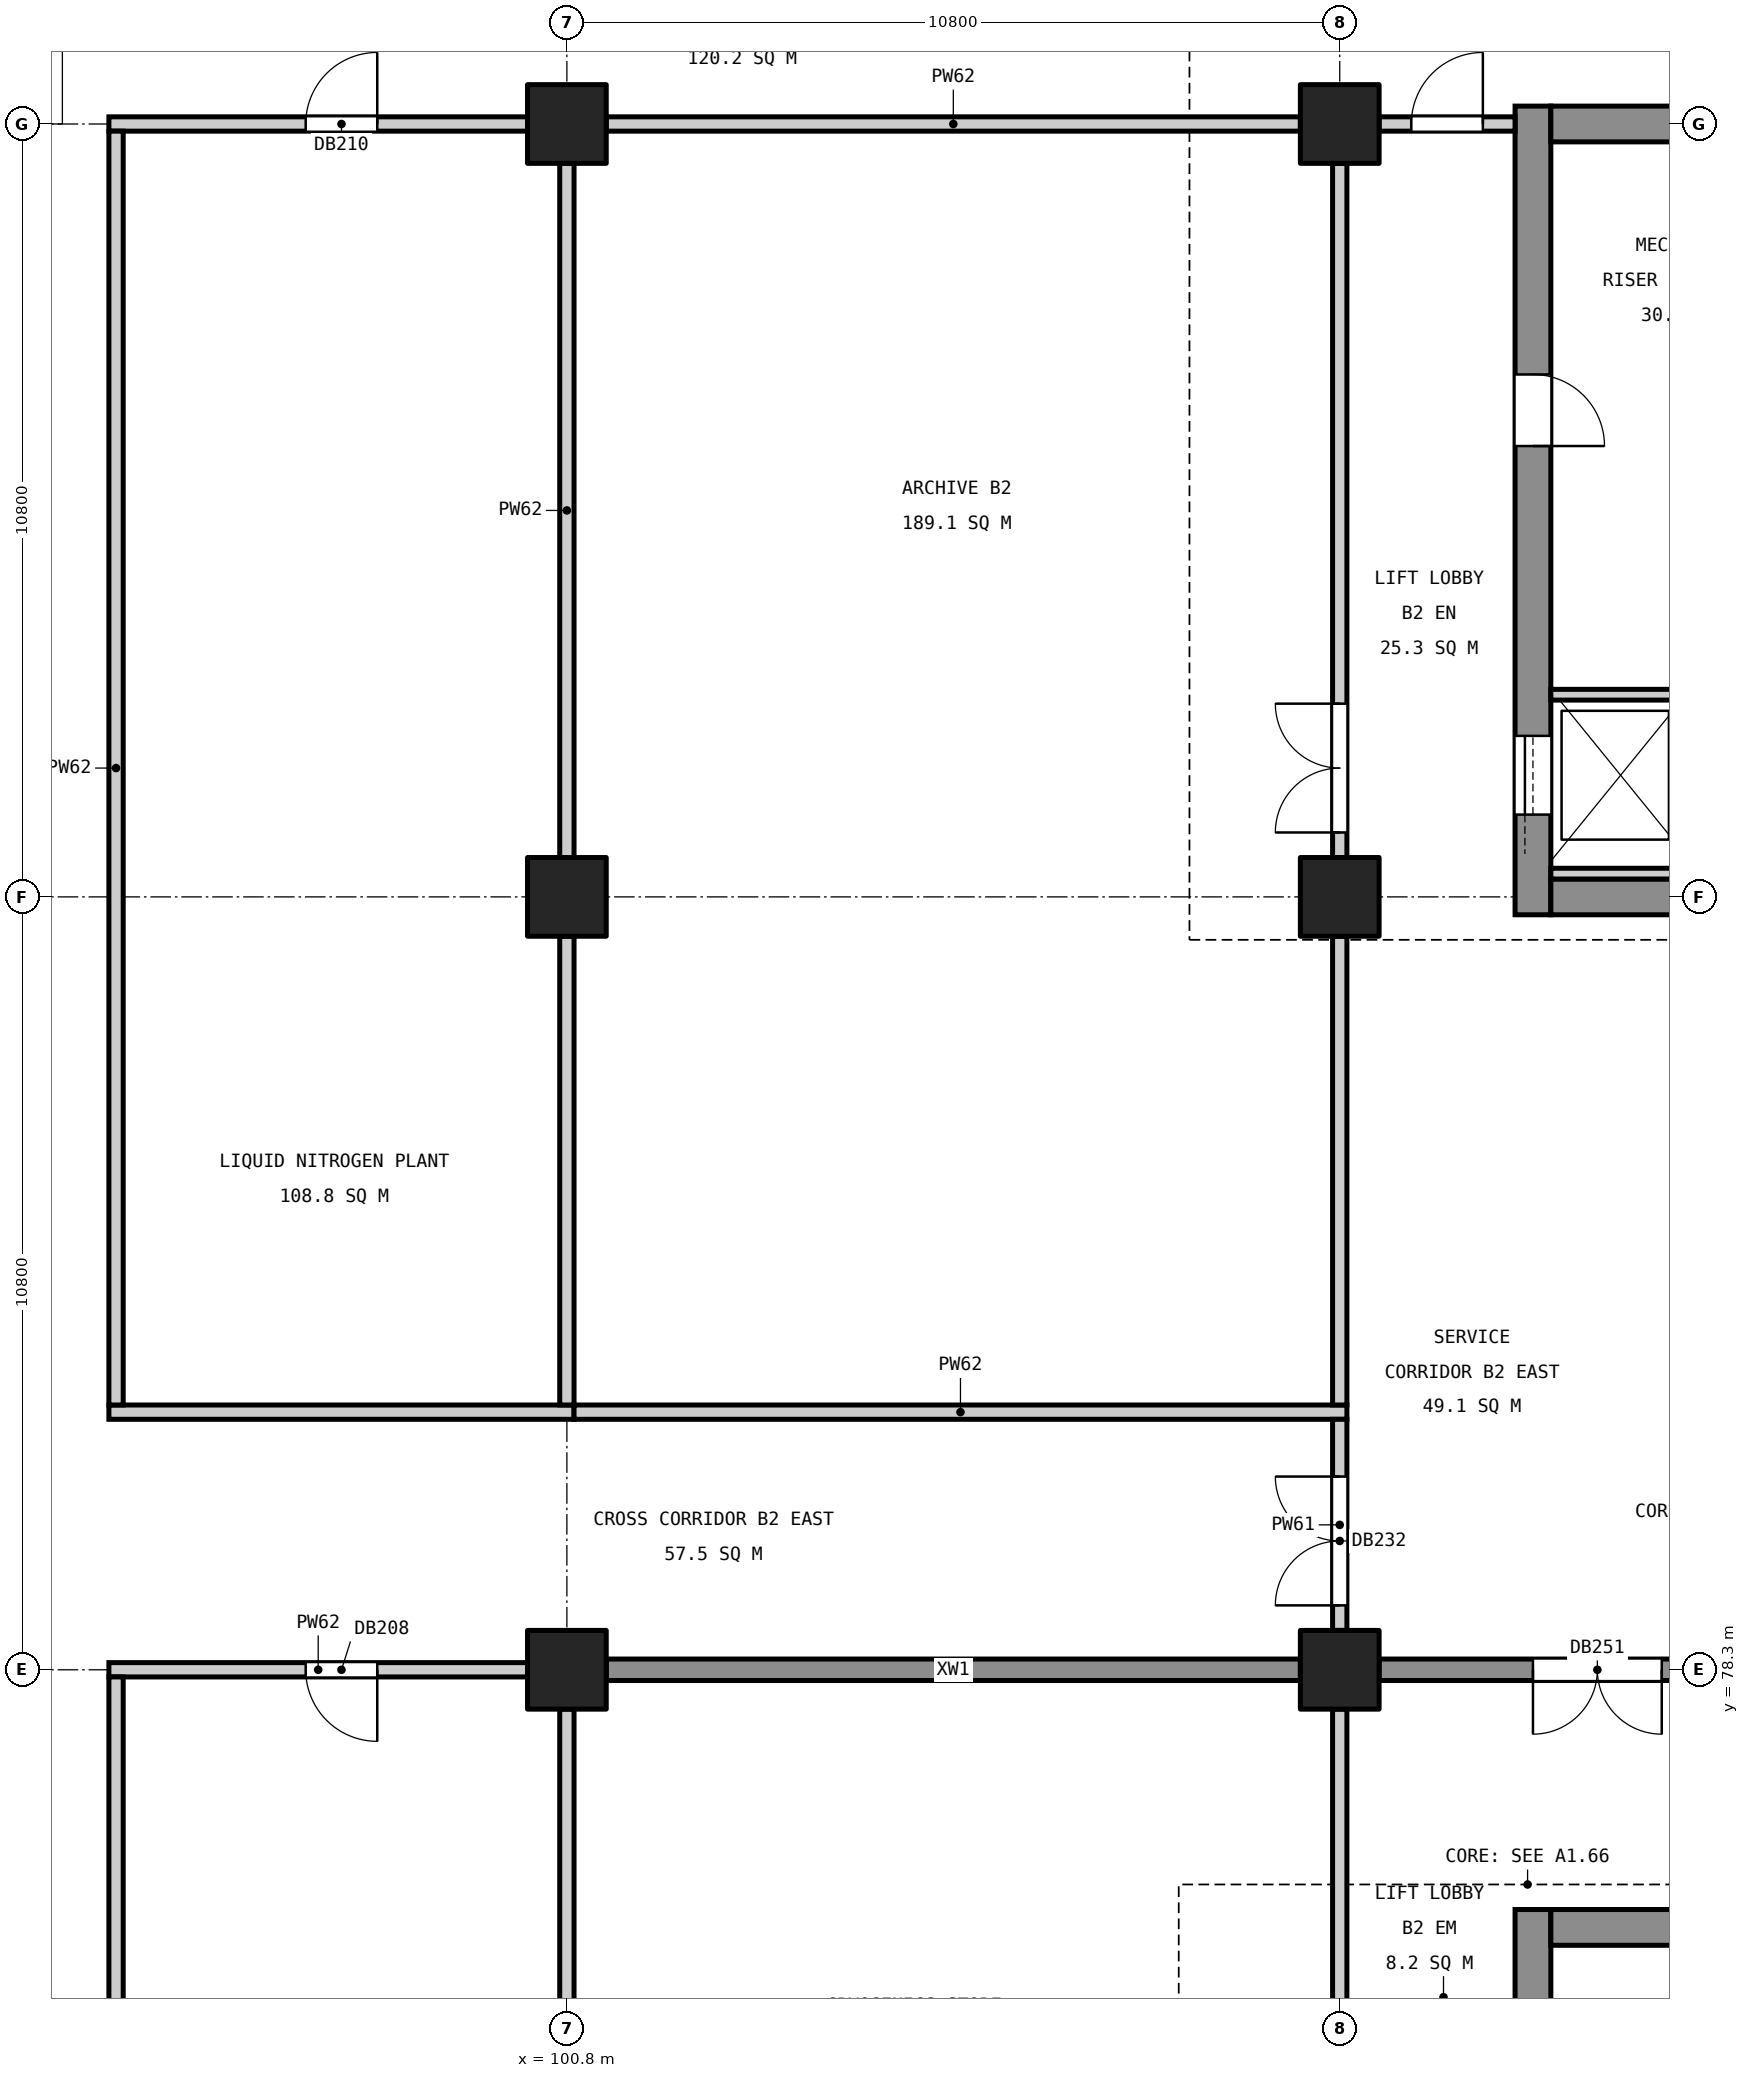
"""IFC4 building model, lengths in metres.
Left out: names, types, materials, properties, quantities, classifications, styles, units other than length and angle.
Written with IfcOpenShell. Run it as: python <this file> out.ifc"""

import sys

from ifc_helpers import new_model, si_unit, direction, frame, frame_2d, origin, origin_2d, place, context, subcontext, project, spatial, rectangle, extrude, element, fill, save


model = new_model("IFC4")
c1 = context("Model", 3, precision=1e-05, world=origin(), true_north=direction((0.0, 1.0)))
c2 = subcontext(c1, "Body", "Model", "MODEL_VIEW")
j1 = project(units=[si_unit("LENGTHUNIT", "METRE"), si_unit("PLANEANGLEUNIT", "RADIAN")], contexts=[c1])
p1 = place(None, origin())
s1 = spatial("IfcSite", under=j1, at=p1, CompositionType="ELEMENT")
p2 = place(p1, origin())
s2 = spatial("IfcBuilding", under=s1, at=p2, CompositionType="ELEMENT")
p3 = place(p2, frame((0.0, 0.0, -9.6)))
s3 = spatial("IfcBuildingStorey", under=s2, at=p3, CompositionType="ELEMENT", Elevation=-9.6)
for number, where, z_axis, x_axis in (
    (1, (111.6, 78.3, 0.0), (0.0, 0.0, 1.0), (1.0, 0.0, 0.0)),
    (2, (111.6, 89.1, 0.0), (0.0, 0.0, 1.0), (1.0, 0.0, 0.0)),
    (3, (111.6, 99.9, 0.0), (0.0, 0.0, 1.0), (1.0, 0.0, 0.0)),
    (4, (100.8, 78.3, 0.0), (0.0, 0.0, 1.0), (1.0, 0.0, 0.0)),
    (5, (100.8, 89.1, 0.0), (0.0, 0.0, 1.0), (1.0, 0.0, 0.0)),
    (6, (100.8, 99.9, 0.0), (0.0, 0.0, 1.0), (1.0, 0.0, 0.0)),
):
    element("IfcColumn", number, at=place(p3, frame(where, z_axis=z_axis, x_axis=x_axis)), inside=s3, PredefinedType="COLUMN", context=c2, shape_type="SweptSolid", body=[
        extrude(rectangle(XDim=1.1, YDim=1.1, at=origin_2d()), origin(), (0.0, 0.0, 1.0), 4.35),
    ])
p4 = place(p3, frame((114.3, 60.05, 0.0), z_axis=(0.0, 0.0, 1.0), x_axis=(0.0, 1.0, 0.0)))
e7 = element("IfcWall", 7, at=p4, inside=s3, PredefinedType="SHEAR", context=c2, shape_type="SweptSolid", body=[
    extrude(rectangle(XDim=14.9, YDim=0.5, at=frame_2d((7.45, 0.0))), origin(), (0.0, 0.0, 1.0), 4.35),
])
p5 = place(p4, frame((8.85, 0.0, 0.0)))
e8 = element("IfcOpeningElement", 8, at=p5, cuts=e7, PredefinedType="OPENING", context=c2, shape_type="SweptSolid", body=[
    extrude(rectangle(XDim=1.1, YDim=2.1, at=frame_2d((0.55, 1.05))), frame((0.0, 0.26, 0.0), z_axis=(0.0, -1.0, 0.0), x_axis=(1.0, 0.0, 0.0)), (0.0, 0.0, 1.0), 0.52),
])
p6 = place(p4, frame((11.4, 0.0, 0.0)))
e9 = element("IfcOpeningElement", 9, at=p6, cuts=e7, PredefinedType="OPENING", context=c2, shape_type="SweptSolid", body=[
    extrude(rectangle(XDim=1.1, YDim=2.1, at=frame_2d((0.55, 1.05))), frame((0.0, 0.26, 0.0), z_axis=(0.0, -1.0, 0.0), x_axis=(1.0, 0.0, 0.0)), (0.0, 0.0, 1.0), 0.52),
])
p7 = place(p4, frame((3.75, 0.0, 0.0)))
e10 = element("IfcOpeningElement", 10, at=p7, cuts=e7, PredefinedType="OPENING", context=c2, shape_type="SweptSolid", body=[
    extrude(rectangle(XDim=1.0, YDim=2.1, at=frame_2d((0.5, 1.05))), frame((0.0, 0.26, 0.0), z_axis=(0.0, -1.0, 0.0), x_axis=(1.0, 0.0, 0.0)), (0.0, 0.0, 1.0), 0.52),
])
p8 = place(p3, frame((118.55, 74.7, 0.0), z_axis=(0.0, 0.0, 1.0), x_axis=(-1.0, 0.0, 0.0)))
e11 = element("IfcWall", 11, at=p8, inside=s3, PredefinedType="SHEAR", context=c2, shape_type="SweptSolid", body=[
    extrude(rectangle(XDim=4.0, YDim=0.5, at=frame_2d((2.0, 0.0))), origin(), (0.0, 0.0, 1.0), 4.35),
])
p9 = place(p3, frame((114.3, 88.85, 0.0), z_axis=(0.0, 0.0, 1.0), x_axis=(0.0, 1.0, 0.0)))
e12 = element("IfcWall", 12, at=p9, inside=s3, PredefinedType="SHEAR", context=c2, shape_type="SweptSolid", body=[
    extrude(rectangle(XDim=11.3, YDim=0.5, at=frame_2d((5.65, 0.0))), origin(), (0.0, 0.0, 1.0), 4.35),
])
p10 = place(p9, frame((1.4, 0.0, 0.0)))
e13 = element("IfcOpeningElement", 13, at=p10, cuts=e12, PredefinedType="OPENING", context=c2, shape_type="SweptSolid", body=[
    extrude(rectangle(XDim=1.1, YDim=2.1, at=frame_2d((0.55, 1.05))), frame((0.0, 0.26, 0.0), z_axis=(0.0, -1.0, 0.0), x_axis=(1.0, 0.0, 0.0)), (0.0, 0.0, 1.0), 0.52),
])
p11 = place(p9, frame((6.55, 0.0, 0.0)))
e14 = element("IfcOpeningElement", 14, at=p11, cuts=e12, PredefinedType="OPENING", context=c2, shape_type="SweptSolid", body=[
    extrude(rectangle(XDim=1.0, YDim=2.1, at=frame_2d((0.5, 1.05))), frame((0.0, 0.26, 0.0), z_axis=(0.0, -1.0, 0.0), x_axis=(1.0, 0.0, 0.0)), (0.0, 0.0, 1.0), 0.52),
])
for number, where, z_axis, x_axis in (
    (15, (118.55, 89.1, 0.0), (0.0, 0.0, 1.0), (-1.0, 0.0, 0.0)),
    (16, (118.55, 99.9, 0.0), (0.0, 0.0, 1.0), (-1.0, 0.0, 0.0)),
):
    element("IfcWall", number, at=place(p3, frame(where, z_axis=z_axis, x_axis=x_axis)), inside=s3, PredefinedType="SHEAR", context=c2, shape_type="SweptSolid", body=[
        extrude(rectangle(XDim=4.0, YDim=0.5, at=frame_2d((2.0, 0.0))), origin(), (0.0, 0.0, 1.0), 4.35),
    ])
p12 = place(p3, frame((118.25, 78.3, 0.0), z_axis=(0.0, 0.0, 1.0), x_axis=(-1.0, 0.0, 0.0)))
e17 = element("IfcWall", 17, at=p12, inside=s3, PredefinedType="SHEAR", context=c2, shape_type="SweptSolid", body=[
    extrude(rectangle(XDim=6.1, YDim=0.3, at=frame_2d((3.05, 0.0))), origin(), (0.0, 0.0, 1.0), 4.35),
])
p13 = place(p12, frame((2.15, 0.0, 0.0)))
e18 = element("IfcOpeningElement", 18, at=p13, cuts=e17, PredefinedType="OPENING", context=c2, shape_type="SweptSolid", body=[
    extrude(rectangle(XDim=1.8, YDim=2.1, at=frame_2d((0.9, 1.05))), frame((0.0, 0.16, 0.0), z_axis=(0.0, -1.0, 0.0), x_axis=(1.0, 0.0, 0.0)), (0.0, 0.0, 1.0), 0.32),
])
p14 = place(p3, frame((111.05, 78.3, 0.0), z_axis=(0.0, 0.0, 1.0), x_axis=(-1.0, 0.0, 0.0)))
e19 = element("IfcWall", 19, at=p14, inside=s3, PredefinedType="SHEAR", context=c2, shape_type="SweptSolid", body=[
    extrude(rectangle(XDim=9.7, YDim=0.3, at=frame_2d((4.85, 0.0))), origin(), (0.0, 0.0, 1.0), 4.35),
])
for number, where, z_axis, x_axis in (
    (20, (116.35, 91.925, 0.0), (0.0, 0.0, 1.0), (-1.0, 0.0, 0.0)),
    (21, (116.35, 89.425, 0.0), (0.0, 0.0, 1.0), (-1.0, 0.0, 0.0)),
):
    element("IfcWall", number, at=place(p3, frame(where, z_axis=z_axis, x_axis=x_axis)), inside=s3, PredefinedType="SOLIDWALL", context=c2, shape_type="SweptSolid", body=[
        extrude(rectangle(XDim=1.8, YDim=0.15, at=frame_2d((0.9, 0.0))), origin(), (0.0, 0.0, 1.0), 4.8),
    ])
p15 = place(p3, frame((94.4, 78.3, 0.0), z_axis=(0.0, 0.0, 1.0), x_axis=(1.0, 0.0, 0.0)))
e22 = element("IfcWall", 22, at=p15, inside=s3, PredefinedType="PARTITIONING", context=c2, shape_type="SweptSolid", body=[
    extrude(rectangle(XDim=5.85, YDim=0.2, at=frame_2d((2.925, 0.0))), origin(), (0.0, 0.0, 1.0), 4.35),
])
p16 = place(p15, frame((2.75, 0.0, 0.0)))
e23 = element("IfcOpeningElement", 23, at=p16, cuts=e22, PredefinedType="OPENING", context=c2, shape_type="SweptSolid", body=[
    extrude(rectangle(XDim=1.0, YDim=2.1, at=frame_2d((0.5, 1.05))), frame((0.0, 0.11, 0.0), z_axis=(0.0, -1.0, 0.0), x_axis=(1.0, 0.0, 0.0)), (0.0, 0.0, 1.0), 0.22),
])
p17 = place(p3, frame((94.4, 81.9, 0.0), z_axis=(0.0, 0.0, 1.0), x_axis=(1.0, 0.0, 0.0)))
e24 = element("IfcWall", 24, at=p17, inside=s3, PredefinedType="PARTITIONING", context=c2, shape_type="SweptSolid", body=[
    extrude(rectangle(XDim=6.5, YDim=0.2, at=frame_2d((3.25, 0.0))), origin(), (0.0, 0.0, 1.0), 4.35),
])
p18 = place(p3, frame((100.9, 81.9, 0.0), z_axis=(0.0, 0.0, 1.0), x_axis=(1.0, 0.0, 0.0)))
e25 = element("IfcWall", 25, at=p18, inside=s3, PredefinedType="PARTITIONING", context=c2, shape_type="SweptSolid", body=[
    extrude(rectangle(XDim=10.8, YDim=0.2, at=frame_2d((5.4, 0.0))), origin(), (0.0, 0.0, 1.0), 4.35),
])
p19 = place(p3, frame((94.4, 99.9, 0.0), z_axis=(0.0, 0.0, 1.0), x_axis=(1.0, 0.0, 0.0)))
e26 = element("IfcWall", 26, at=p19, inside=s3, PredefinedType="PARTITIONING", context=c2, shape_type="SweptSolid", body=[
    extrude(rectangle(XDim=5.85, YDim=0.2, at=frame_2d((2.925, 0.0))), origin(), (0.0, 0.0, 1.0), 4.35),
])
p20 = place(p19, frame((2.75, 0.0, 0.0)))
e27 = element("IfcOpeningElement", 27, at=p20, cuts=e26, PredefinedType="OPENING", context=c2, shape_type="SweptSolid", body=[
    extrude(rectangle(XDim=1.0, YDim=2.1, at=frame_2d((0.5, 1.05))), frame((0.0, 0.11, 0.0), z_axis=(0.0, -1.0, 0.0), x_axis=(1.0, 0.0, 0.0)), (0.0, 0.0, 1.0), 0.22),
])
p21 = place(p3, frame((101.35, 99.9, 0.0), z_axis=(0.0, 0.0, 1.0), x_axis=(1.0, 0.0, 0.0)))
e28 = element("IfcWall", 28, at=p21, inside=s3, PredefinedType="PARTITIONING", context=c2, shape_type="SweptSolid", body=[
    extrude(rectangle(XDim=9.7, YDim=0.2, at=frame_2d((4.85, 0.0))), origin(), (0.0, 0.0, 1.0), 4.35),
])
p22 = place(p3, frame((112.15, 99.9, 0.0), z_axis=(0.0, 0.0, 1.0), x_axis=(1.0, 0.0, 0.0)))
e29 = element("IfcWall", 29, at=p22, inside=s3, PredefinedType="PARTITIONING", context=c2, shape_type="SweptSolid", body=[
    extrude(rectangle(XDim=1.9, YDim=0.2, at=frame_2d((0.95, 0.0))), origin(), (0.0, 0.0, 1.0), 4.35),
])
p23 = place(p22, frame((0.45, 0.0, 0.0)))
e30 = element("IfcOpeningElement", 30, at=p23, cuts=e29, PredefinedType="OPENING", context=c2, shape_type="SweptSolid", body=[
    extrude(rectangle(XDim=1.0, YDim=2.1, at=frame_2d((0.5, 1.05))), frame((0.0, 0.11, 0.0), z_axis=(0.0, -1.0, 0.0), x_axis=(1.0, 0.0, 0.0)), (0.0, 0.0, 1.0), 0.22),
])
p24 = place(p3, frame((94.5, 69.4, 0.0), z_axis=(0.0, 0.0, 1.0), x_axis=(0.0, 1.0, 0.0)))
e31 = element("IfcWall", 31, at=p24, inside=s3, PredefinedType="PARTITIONING", context=c2, shape_type="SweptSolid", body=[
    extrude(rectangle(XDim=8.8, YDim=0.2, at=frame_2d((4.4, 0.0))), origin(), (0.0, 0.0, 1.0), 4.35),
])
p25 = place(p3, frame((94.5, 82.0, 0.0), z_axis=(0.0, 0.0, 1.0), x_axis=(0.0, 1.0, 0.0)))
e32 = element("IfcWall", 32, at=p25, inside=s3, PredefinedType="PARTITIONING", context=c2, shape_type="SweptSolid", body=[
    extrude(rectangle(XDim=17.8, YDim=0.2, at=frame_2d((8.9, 0.0))), origin(), (0.0, 0.0, 1.0), 4.35),
])
p26 = place(p3, frame((100.8, 69.4, 0.0), z_axis=(0.0, 0.0, 1.0), x_axis=(0.0, 1.0, 0.0)))
e33 = element("IfcWall", 33, at=p26, inside=s3, PredefinedType="PARTITIONING", context=c2, shape_type="SweptSolid", body=[
    extrude(rectangle(XDim=8.35, YDim=0.2, at=frame_2d((4.175, 0.0))), origin(), (0.0, 0.0, 1.0), 4.35),
])
p27 = place(p3, frame((100.8, 82.0, 0.0), z_axis=(0.0, 0.0, 1.0), x_axis=(0.0, 1.0, 0.0)))
e34 = element("IfcWall", 34, at=p27, inside=s3, PredefinedType="PARTITIONING", context=c2, shape_type="SweptSolid", body=[
    extrude(rectangle(XDim=6.55, YDim=0.2, at=frame_2d((3.275, 0.0))), origin(), (0.0, 0.0, 1.0), 4.35),
])
p28 = place(p3, frame((100.8, 89.65, 0.0), z_axis=(0.0, 0.0, 1.0), x_axis=(0.0, 1.0, 0.0)))
e35 = element("IfcWall", 35, at=p28, inside=s3, PredefinedType="PARTITIONING", context=c2, shape_type="SweptSolid", body=[
    extrude(rectangle(XDim=9.7, YDim=0.2, at=frame_2d((4.85, 0.0))), origin(), (0.0, 0.0, 1.0), 4.35),
])
p29 = place(p3, frame((111.6, 71.2, 0.0), z_axis=(0.0, 0.0, 1.0), x_axis=(0.0, 1.0, 0.0)))
e36 = element("IfcWall", 36, at=p29, inside=s3, PredefinedType="PARTITIONING", context=c2, shape_type="SweptSolid", body=[
    extrude(rectangle(XDim=6.55, YDim=0.2, at=frame_2d((3.275, 0.0))), origin(), (0.0, 0.0, 1.0), 4.35),
])
p30 = place(p29, frame((0.3, 0.0, 0.0)))
e37 = element("IfcOpeningElement", 37, at=p30, cuts=e36, PredefinedType="OPENING", context=c2, shape_type="SweptSolid", body=[
    extrude(rectangle(XDim=1.8, YDim=2.1, at=frame_2d((0.9, 1.05))), frame((0.0, 0.11, 0.0), z_axis=(0.0, -1.0, 0.0), x_axis=(1.0, 0.0, 0.0)), (0.0, 0.0, 1.0), 0.22),
])
p31 = place(p3, frame((111.6, 78.85, 0.0), z_axis=(0.0, 0.0, 1.0), x_axis=(0.0, 1.0, 0.0)))
e38 = element("IfcWall", 38, at=p31, inside=s3, PredefinedType="PARTITIONING", context=c2, shape_type="SweptSolid", body=[
    extrude(rectangle(XDim=2.95, YDim=0.2, at=frame_2d((1.475, 0.0))), origin(), (0.0, 0.0, 1.0), 4.35),
])
p32 = place(p31, frame((0.35, 0.0, 0.0)))
e39 = element("IfcOpeningElement", 39, at=p32, cuts=e38, PredefinedType="OPENING", context=c2, shape_type="SweptSolid", body=[
    extrude(rectangle(XDim=1.8, YDim=2.1, at=frame_2d((0.9, 1.05))), frame((0.0, 0.11, 0.0), z_axis=(0.0, -1.0, 0.0), x_axis=(1.0, 0.0, 0.0)), (0.0, 0.0, 1.0), 0.22),
])
p33 = place(p3, frame((111.6, 82.0, 0.0), z_axis=(0.0, 0.0, 1.0), x_axis=(0.0, 1.0, 0.0)))
e40 = element("IfcWall", 40, at=p33, inside=s3, PredefinedType="PARTITIONING", context=c2, shape_type="SweptSolid", body=[
    extrude(rectangle(XDim=6.55, YDim=0.2, at=frame_2d((3.275, 0.0))), origin(), (0.0, 0.0, 1.0), 4.35),
])
p34 = place(p3, frame((111.6, 89.65, 0.0), z_axis=(0.0, 0.0, 1.0), x_axis=(0.0, 1.0, 0.0)))
e41 = element("IfcWall", 41, at=p34, inside=s3, PredefinedType="PARTITIONING", context=c2, shape_type="SweptSolid", body=[
    extrude(rectangle(XDim=9.7, YDim=0.2, at=frame_2d((4.85, 0.0))), origin(), (0.0, 0.0, 1.0), 4.35),
])
p35 = place(p34, frame((0.35, 0.0, 0.0)))
e42 = element("IfcOpeningElement", 42, at=p35, cuts=e41, PredefinedType="OPENING", context=c2, shape_type="SweptSolid", body=[
    extrude(rectangle(XDim=1.8, YDim=2.1, at=frame_2d((0.9, 1.05))), frame((0.0, 0.11, 0.0), z_axis=(0.0, -1.0, 0.0), x_axis=(1.0, 0.0, 0.0)), (0.0, 0.0, 1.0), 0.22),
])
p36 = place(p10, origin())
e43 = element("IfcDoor", 43, at=p36, inside=s3, OperationType="SLIDING_TO_LEFT", PredefinedType="DOOR", context=c2, shape_type="SweptSolid", body=[
    extrude(rectangle(XDim=1.1, YDim=2.1, at=frame_2d((0.55, 1.05))), frame((0.0, 0.025, 0.0), z_axis=(0.0, -1.0, 0.0), x_axis=(1.0, 0.0, 0.0)), (0.0, 0.0, 1.0), 0.05),
])
fill(e13, e43)
p37 = place(p16, frame((1.0, 0.0, 0.0), z_axis=(0.0, 0.0, 1.0), x_axis=(-1.0, 0.0, 0.0)))
e44 = element("IfcDoor", 44, at=p37, inside=s3, OperationType="SINGLE_SWING_LEFT", PredefinedType="DOOR", context=c2, shape_type="SweptSolid", body=[
    extrude(rectangle(XDim=1.0, YDim=2.1, at=frame_2d((0.5, 1.05))), frame((0.0, 0.025, 0.0), z_axis=(0.0, -1.0, 0.0), x_axis=(1.0, 0.0, 0.0)), (0.0, 0.0, 1.0), 0.05),
])
fill(e23, e44)
p38 = place(p20, origin())
e45 = element("IfcDoor", 45, at=p38, inside=s3, OperationType="SINGLE_SWING_RIGHT", PredefinedType="DOOR", context=c2, shape_type="SweptSolid", body=[
    extrude(rectangle(XDim=1.0, YDim=2.1, at=frame_2d((0.5, 1.05))), frame((0.0, 0.025, 0.0), z_axis=(0.0, -1.0, 0.0), x_axis=(1.0, 0.0, 0.0)), (0.0, 0.0, 1.0), 0.05),
])
fill(e27, e45)
p39 = place(p35, origin())
e46 = element("IfcDoor", 46, at=p39, inside=s3, OperationType="DOUBLE_DOOR_SINGLE_SWING", PredefinedType="DOOR", context=c2, shape_type="SweptSolid", body=[
    extrude(rectangle(XDim=1.8, YDim=2.1, at=frame_2d((0.9, 1.05))), frame((0.0, 0.025, 0.0), z_axis=(0.0, -1.0, 0.0), x_axis=(1.0, 0.0, 0.0)), (0.0, 0.0, 1.0), 0.05),
])
fill(e42, e46)
p40 = place(p23, origin())
e47 = element("IfcDoor", 47, at=p40, inside=s3, OperationType="SINGLE_SWING_RIGHT", PredefinedType="DOOR", context=c2, shape_type="SweptSolid", body=[
    extrude(rectangle(XDim=1.0, YDim=2.1, at=frame_2d((0.5, 1.05))), frame((0.0, 0.025, 0.0), z_axis=(0.0, -1.0, 0.0), x_axis=(1.0, 0.0, 0.0)), (0.0, 0.0, 1.0), 0.05),
])
fill(e30, e47)
p41 = place(p32, origin())
e48 = element("IfcDoor", 48, at=p41, inside=s3, OperationType="DOUBLE_DOOR_SINGLE_SWING", PredefinedType="DOOR", context=c2, shape_type="SweptSolid", body=[
    extrude(rectangle(XDim=1.8, YDim=2.1, at=frame_2d((0.9, 1.05))), frame((0.0, 0.025, 0.0), z_axis=(0.0, -1.0, 0.0), x_axis=(1.0, 0.0, 0.0)), (0.0, 0.0, 1.0), 0.05),
])
fill(e39, e48)
p42 = place(p11, frame((1.0, 0.0, 0.0), z_axis=(0.0, 0.0, 1.0), x_axis=(-1.0, 0.0, 0.0)))
e49 = element("IfcDoor", 49, at=p42, inside=s3, OperationType="SINGLE_SWING_RIGHT", PredefinedType="DOOR", context=c2, shape_type="SweptSolid", body=[
    extrude(rectangle(XDim=1.0, YDim=2.1, at=frame_2d((0.5, 1.05))), frame((0.0, 0.025, 0.0), z_axis=(0.0, -1.0, 0.0), x_axis=(1.0, 0.0, 0.0)), (0.0, 0.0, 1.0), 0.05),
])
fill(e14, e49)
p43 = place(p13, origin())
e50 = element("IfcDoor", 50, at=p43, inside=s3, OperationType="DOUBLE_DOOR_SINGLE_SWING", PredefinedType="DOOR", context=c2, shape_type="SweptSolid", body=[
    extrude(rectangle(XDim=1.8, YDim=2.1, at=frame_2d((0.9, 1.05))), frame((0.0, 0.025, 0.0), z_axis=(0.0, -1.0, 0.0), x_axis=(1.0, 0.0, 0.0)), (0.0, 0.0, 1.0), 0.05),
])
fill(e18, e50)
save(model, sys.argv[1])
